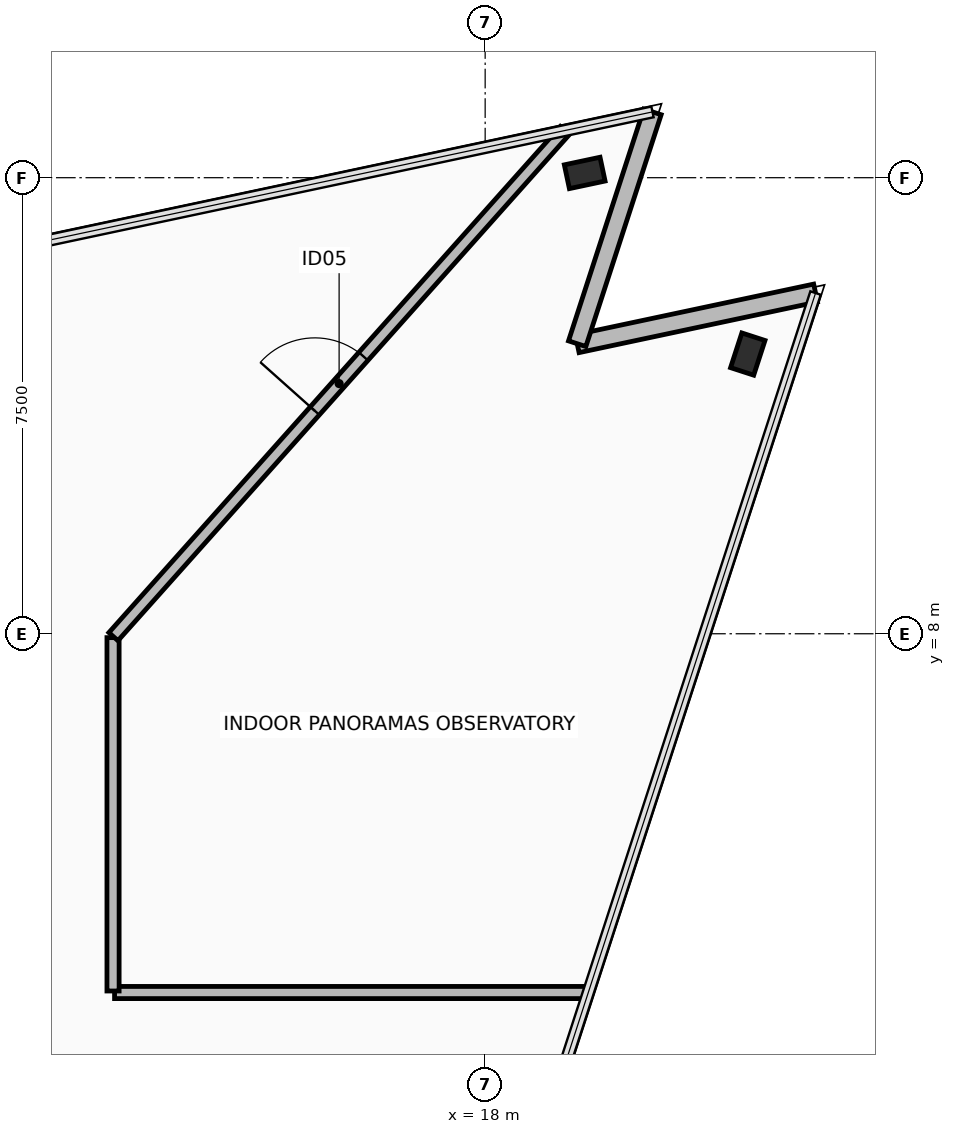
"""IFC4 building model, lengths in metres.
Left out: names, types, materials, properties, quantities, classifications, styles, units other than length and angle.
Written with IfcOpenShell. Run it as: python <this file> out.ifc"""

import sys

from ifc_helpers import new_model, si_unit, direction, frame, frame_2d, origin, origin_2d, place, context, subcontext, project, spatial, rectangle, hollow_rectangle, extrude, element, fill, save


model = new_model("IFC4")
c1 = context("Model", 3, precision=1e-05, world=origin(), true_north=direction((0.0, 1.0)))
c2 = subcontext(c1, "Body", "Model", "MODEL_VIEW")
j1 = project(units=[si_unit("LENGTHUNIT", "METRE"), si_unit("PLANEANGLEUNIT", "RADIAN")], contexts=[c1])
p1 = place(None, origin())
s1 = spatial("IfcSite", under=j1, at=p1, CompositionType="ELEMENT")
p2 = place(p1, origin())
s2 = spatial("IfcBuilding", under=s1, at=p2, CompositionType="ELEMENT")
p3 = place(p2, frame((0.0, 0.0, 302.15)))
s3 = spatial("IfcBuildingStorey", under=s2, at=p3, CompositionType="ELEMENT", Elevation=302.15)
for number, where, z_axis, x_axis in (
    (1, (22.319, 12.6, 0.0), (0.0, 0.0, 1.0), (0.309, 0.951, 0.0)),
    (2, (19.637, 15.578, 0.0), (0.0, 0.0, 1.0), (0.978, 0.208, 0.0)),
):
    element("IfcColumn", number, at=place(p3, frame(where, z_axis=z_axis, x_axis=x_axis)), inside=s3, PredefinedType="COLUMN", context=c2, shape_type="SweptSolid", body=[
        extrude(hollow_rectangle(XDim=0.4, YDim=0.6, WallThickness=0.03, at=origin_2d()), origin(), (0.0, 0.0, 1.0), 4.15),
    ])
p4 = place(p3, frame((23.434, 13.603, 0.0), z_axis=(0.0, 0.0, 1.0), x_axis=(-0.97815049033, -0.207898095871, 0.0)))
e3 = element("IfcWall", 3, at=p4, inside=s3, PredefinedType="STANDARD", context=c2, shape_type="SweptSolid", body=[
    extrude(rectangle(XDim=4.008, YDim=0.3, at=frame_2d((2.004, 0.0))), origin(), (0.0, 0.0, 1.0), 3.295),
])
p5 = place(p3, frame((19.513, 12.77, 0.0), z_axis=(0.0, 0.0, 1.0), x_axis=(0.309018580232, 0.951056001018, 0.0)))
e4 = element("IfcWall", 4, at=p5, inside=s3, PredefinedType="STANDARD", context=c2, shape_type="SweptSolid", body=[
    extrude(rectangle(XDim=4.008, YDim=0.3, at=frame_2d((2.004, 0.0))), origin(), (0.0, 0.0, 1.0), 3.295),
])
p6 = place(p3, frame((19.696, 2.1, 0.0), z_axis=(0.0, 0.0, 1.0), x_axis=(-1.0, 0.0, 0.0)))
e5 = element("IfcWall", 5, at=p6, inside=s3, PredefinedType="PARTITIONING", context=c2, shape_type="SweptSolid", body=[
    extrude(rectangle(XDim=7.791, YDim=0.2, at=frame_2d((3.896, 0.0))), origin(), (0.0, 0.0, 1.0), 3.295),
])
p7 = place(p3, frame((11.88, 2.125, 0.0), z_axis=(0.0, 0.0, 1.0), x_axis=(0.0, 1.0, 0.0)))
e6 = element("IfcWall", 6, at=p7, inside=s3, PredefinedType="PARTITIONING", context=c2, shape_type="SweptSolid", body=[
    extrude(rectangle(XDim=5.811, YDim=0.2, at=frame_2d((2.906, 0.0))), origin(), (0.0, 0.0, 1.0), 3.95),
])
p8 = place(p3, frame((11.886, 7.953, 0.0), z_axis=(0.0, 0.0, 1.0), x_axis=(0.665691620666, 0.746226953531, 0.0)))
e7 = element("IfcWall", 7, at=p8, inside=s3, PredefinedType="PARTITIONING", context=c2, shape_type="SweptSolid", body=[
    extrude(rectangle(XDim=11.153, YDim=0.2, at=frame_2d((5.576, 0.0))), origin(), (0.0, 0.0, 1.0), 3.295),
])
p9 = place(p8, frame((4.976, 0.0, 0.0)))
e8 = element("IfcOpeningElement", 8, at=p9, cuts=e7, PredefinedType="OPENING", context=c2, shape_type="SweptSolid", body=[
    extrude(rectangle(XDim=1.2, YDim=2.15, at=frame_2d((0.6, 1.075))), frame((0.0, 0.11, 0.0), z_axis=(0.0, -1.0, 0.0), x_axis=(1.0, 0.0, 0.0)), (0.0, 0.0, 1.0), 0.22),
])
p10 = place(p9, origin())
e9 = element("IfcDoor", 9, at=p10, inside=s3, OperationType="SINGLE_SWING_LEFT", PredefinedType="DOOR", context=c2, shape_type="SweptSolid", body=[
    extrude(rectangle(XDim=1.2, YDim=2.15, at=frame_2d((0.6, 1.075))), frame((0.0, 0.025, 0.0), z_axis=(0.0, -1.0, 0.0), x_axis=(1.0, 0.0, 0.0)), (0.0, 0.0, 1.0), 0.05),
])
fill(e8, e9)
save(model, sys.argv[1])
